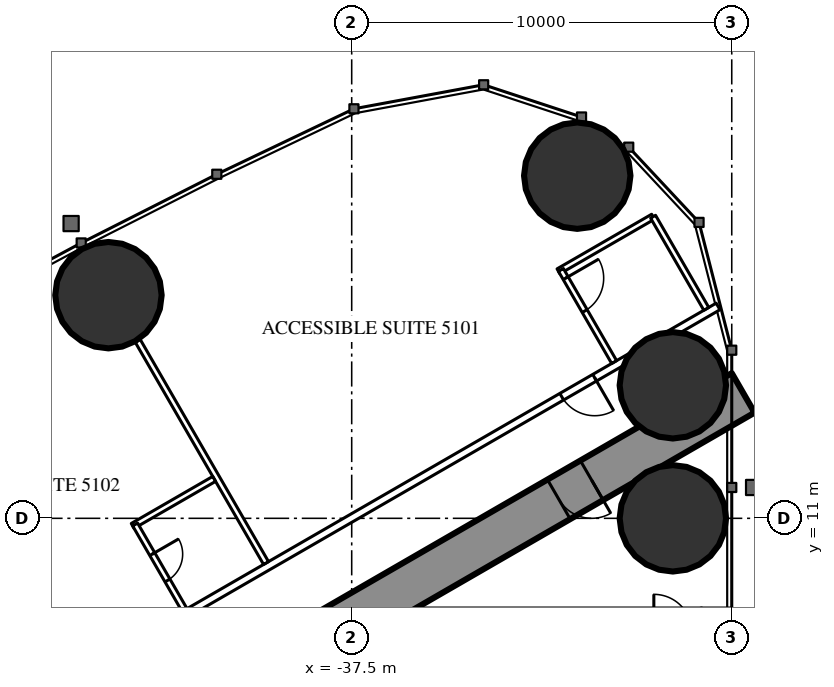
"""IFC4 building model, lengths in metres.
Left out: names, types, materials, properties, quantities, classifications, styles, units other than length and angle.
Written with IfcOpenShell. Run it as: python <this file> out.ifc"""

import sys

from ifc_helpers import new_model, si_unit, direction, frame, frame_2d, origin, origin_2d, place, context, subcontext, project, spatial, rectangle, circle, extrude, element, fill, save


model = new_model("IFC4")
c1 = context("Model", 3, precision=1e-05, world=origin(), true_north=direction((0.0, 1.0)))
c2 = subcontext(c1, "Body", "Model", "MODEL_VIEW")
j1 = project(units=[si_unit("LENGTHUNIT", "METRE"), si_unit("PLANEANGLEUNIT", "RADIAN")], contexts=[c1])
p1 = place(None, origin())
s1 = spatial("IfcSite", under=j1, at=p1, CompositionType="ELEMENT")
p2 = place(p1, origin())
s2 = spatial("IfcBuilding", under=s1, at=p2, CompositionType="ELEMENT")
p3 = place(p2, frame((0.0, 0.0, 191.3)))
s3 = spatial("IfcBuildingStorey", under=s2, at=p3, CompositionType="ELEMENT", Elevation=191.3)
for number, where, z_axis, x_axis in (
    (1, (-31.565, 20.016, 0.0), (0.0, 0.0, 1.0), (1.0, 0.0, 0.0)),
    (2, (-29.05, 11.0, 0.0), (0.0, 0.0, 1.0), (1.0, 0.0, 0.0)),
    (3, (-29.05, 14.5, 0.0), (0.0, 0.0, 1.0), (1.0, 0.0, 0.0)),
    (4, (-43.9, 16.871, 0.0), (0.0, 0.0, 1.0), (1.0, 0.0, 0.0)),
):
    element("IfcColumn", number, at=place(p3, frame(where, z_axis=z_axis, x_axis=x_axis)), inside=s3, PredefinedType="COLUMN", context=c2, shape_type="SweptSolid", body=[
        extrude(circle(Radius=1.4, at=origin_2d()), origin(), (0.0, 0.0, 1.0), 3.5),
    ])
p4 = place(p3, frame((-27.2, 14.3, 0.0), z_axis=(0.0, 0.0, 1.0), x_axis=(-0.866026593062, -0.499997940104, 0.0)))
e5 = element("IfcWall", 5, at=p4, inside=s3, PredefinedType="SHEAR", context=c2, shape_type="SweptSolid", body=[
    extrude(rectangle(XDim=28.946, YDim=1.2, at=frame_2d((14.473, 0.0))), origin(), (0.0, 0.0, 1.0), 3.5),
])
p5 = place(p4, frame((4.6, 0.0, 0.0)))
e6 = element("IfcOpeningElement", 6, at=p5, cuts=e5, PredefinedType="OPENING", context=c2, shape_type="SweptSolid", body=[
    extrude(rectangle(XDim=1.0, YDim=2.2, at=frame_2d((0.5, 1.1))), frame((0.0, 0.61, 0.0), z_axis=(0.0, -1.0, 0.0), x_axis=(1.0, 0.0, 0.0)), (0.0, 0.0, 1.0), 1.22),
])
p6 = place(p4, frame((13.395, 0.0, 0.0)))
e7 = element("IfcOpeningElement", 7, at=p6, cuts=e5, PredefinedType="OPENING", context=c2, shape_type="SweptSolid", body=[
    extrude(rectangle(XDim=1.8, YDim=2.2, at=frame_2d((0.9, 1.1))), frame((0.0, 0.61, 0.0), z_axis=(0.0, -1.0, 0.0), x_axis=(1.0, 0.0, 0.0)), (0.0, 0.0, 1.0), 1.22),
])
p7 = place(p3, frame((-27.86, 16.575, 0.0), z_axis=(0.0, 0.0, 1.0), x_axis=(-0.866025533911, -0.499999774615, 0.0)))
e8 = element("IfcWall", 8, at=p7, inside=s3, PredefinedType="PARTITIONING", context=c2, shape_type="SweptSolid", body=[
    extrude(rectangle(XDim=33.149, YDim=0.2, at=frame_2d((16.575, 0.0))), origin(), (0.0, 0.0, 1.0), 3.25),
])
p8 = place(p7, frame((3.75, 0.0, 0.0)))
e9 = element("IfcOpeningElement", 9, at=p8, cuts=e8, PredefinedType="OPENING", context=c2, shape_type="SweptSolid", body=[
    extrude(rectangle(XDim=1.0, YDim=2.2, at=frame_2d((0.5, 1.1))), frame((0.0, 0.11, 0.0), z_axis=(0.0, -1.0, 0.0), x_axis=(1.0, 0.0, 0.0)), (0.0, 0.0, 1.0), 0.22),
])
p9 = place(p7, frame((16.402, 0.0, 0.0)))
e10 = element("IfcOpeningElement", 10, at=p9, cuts=e8, PredefinedType="OPENING", context=c2, shape_type="SweptSolid", body=[
    extrude(rectangle(XDim=0.95, YDim=2.2, at=frame_2d((0.475, 1.1))), frame((0.0, 0.11, 0.0), z_axis=(0.0, -1.0, 0.0), x_axis=(1.0, 0.0, 0.0)), (0.0, 0.0, 1.0), 0.22),
])
p10 = place(p7, frame((22.047, 0.0, 0.0)))
e11 = element("IfcOpeningElement", 11, at=p10, cuts=e8, PredefinedType="OPENING", context=c2, shape_type="SweptSolid", body=[
    extrude(rectangle(XDim=0.95, YDim=2.2, at=frame_2d((0.475, 1.1))), frame((0.0, 0.11, 0.0), z_axis=(0.0, -1.0, 0.0), x_axis=(1.0, 0.0, 0.0)), (0.0, 0.0, 1.0), 0.22),
])
p11 = place(p7, frame((30.396, 0.0, 0.0)))
e12 = element("IfcOpeningElement", 12, at=p11, cuts=e8, PredefinedType="OPENING", context=c2, shape_type="SweptSolid", body=[
    extrude(rectangle(XDim=1.8, YDim=2.2, at=frame_2d((0.9, 1.1))), frame((0.0, 0.11, 0.0), z_axis=(0.0, -1.0, 0.0), x_axis=(1.0, 0.0, 0.0)), (0.0, 0.0, 1.0), 0.22),
])
p12 = place(p3, frame((-39.754, 9.823, 0.0), z_axis=(0.0, 0.0, 1.0), x_axis=(-0.499997670926, 0.866026748472, 0.0)))
e13 = element("IfcWall", 13, at=p12, inside=s3, PredefinedType="PARTITIONING", context=c2, shape_type="SweptSolid", body=[
    extrude(rectangle(XDim=6.757, YDim=0.15, at=frame_2d((3.379, 0.0))), origin(), (0.0, 0.0, 1.0), 2.3),
])
p13 = place(p3, frame((-29.57, 18.936, 0.0), z_axis=(0.0, 0.0, 1.0), x_axis=(-0.866018712932, -0.500011588718, 0.0)))
e14 = element("IfcWall", 14, at=p13, inside=s3, PredefinedType="PARTITIONING", context=c2, shape_type="SweptSolid", body=[
    extrude(rectangle(XDim=2.875, YDim=0.15, at=frame_2d((1.438, 0.0))), origin(), (0.0, 0.0, 1.0), 3.25),
])
p14 = place(p3, frame((-30.595, 15.111, 0.0), z_axis=(0.0, 0.0, 1.0), x_axis=(-0.49998411664, 0.866034573852, 0.0)))
e15 = element("IfcWall", 15, at=p14, inside=s3, PredefinedType="PARTITIONING", context=c2, shape_type="SweptSolid", body=[
    extrude(rectangle(XDim=2.8, YDim=0.15, at=frame_2d((1.4, 0.0))), origin(), (0.0, 0.0, 1.0), 3.25),
])
p15 = place(p14, frame((1.55, 0.0, 0.0)))
e16 = element("IfcOpeningElement", 16, at=p15, cuts=e15, PredefinedType="OPENING", context=c2, shape_type="SweptSolid", body=[
    extrude(rectangle(XDim=1.0, YDim=2.2, at=frame_2d((0.5, 1.1))), frame((0.0, 0.085, 0.0), z_axis=(0.0, -1.0, 0.0), x_axis=(1.0, 0.0, 0.0)), (0.0, 0.0, 1.0), 0.17),
])
p16 = place(p3, frame((-28.17, 16.511, 0.0), z_axis=(0.0, 0.0, 1.0), x_axis=(-0.49994636267, 0.866056369097, 0.0)))
e17 = element("IfcWall", 17, at=p16, inside=s3, PredefinedType="PARTITIONING", context=c2, shape_type="SweptSolid", body=[
    extrude(rectangle(XDim=2.8, YDim=0.15, at=frame_2d((1.4, 0.0))), origin(), (0.0, 0.0, 1.0), 3.25),
])
p17 = place(p3, frame((-41.119, 12.037, 0.0), z_axis=(0.0, 0.0, 1.0), x_axis=(-0.866073894602, -0.499916002032, 0.0)))
e18 = element("IfcWall", 18, at=p17, inside=s3, PredefinedType="PARTITIONING", context=c2, shape_type="SweptSolid", body=[
    extrude(rectangle(XDim=2.475, YDim=0.15, at=frame_2d((1.238, 0.0))), origin(), (0.0, 0.0, 1.0), 3.25),
])
p18 = place(p3, frame((-41.898, 8.585, 0.0), z_axis=(0.0, 0.0, 1.0), x_axis=(-0.500006934395, 0.866021400173, 0.0)))
e19 = element("IfcWall", 19, at=p18, inside=s3, PredefinedType="PARTITIONING", context=c2, shape_type="SweptSolid", body=[
    extrude(rectangle(XDim=2.6, YDim=0.15, at=frame_2d((1.3, 0.0))), origin(), (0.0, 0.0, 1.0), 3.25),
])
p19 = place(p18, frame((0.9, 0.0, 0.0)))
e20 = element("IfcOpeningElement", 20, at=p19, cuts=e19, PredefinedType="OPENING", context=c2, shape_type="SweptSolid", body=[
    extrude(rectangle(XDim=0.8, YDim=2.2, at=frame_2d((0.4, 1.1))), frame((0.0, 0.085, 0.0), z_axis=(0.0, -1.0, 0.0), x_axis=(1.0, 0.0, 0.0)), (0.0, 0.0, 1.0), 0.17),
])
p20 = place(p15, origin())
e21 = element("IfcDoor", 21, at=p20, inside=s3, OperationType="SINGLE_SWING_RIGHT", PredefinedType="DOOR", context=c2, shape_type="SweptSolid", body=[
    extrude(rectangle(XDim=1.0, YDim=2.2, at=frame_2d((0.5, 1.1))), frame((0.0, 0.025, 0.0), z_axis=(0.0, -1.0, 0.0), x_axis=(1.0, 0.0, 0.0)), (0.0, 0.0, 1.0), 0.05),
])
fill(e16, e21)
p21 = place(p8, origin())
e22 = element("IfcDoor", 22, at=p21, inside=s3, OperationType="SINGLE_SWING_LEFT", PredefinedType="DOOR", context=c2, shape_type="SweptSolid", body=[
    extrude(rectangle(XDim=1.0, YDim=2.2, at=frame_2d((0.5, 1.1))), frame((0.0, 0.025, 0.0), z_axis=(0.0, -1.0, 0.0), x_axis=(1.0, 0.0, 0.0)), (0.0, 0.0, 1.0), 0.05),
])
fill(e9, e22)
p22 = place(p19, origin())
e23 = element("IfcDoor", 23, at=p22, inside=s3, OperationType="SINGLE_SWING_RIGHT", PredefinedType="DOOR", context=c2, shape_type="SweptSolid", body=[
    extrude(rectangle(XDim=0.8, YDim=2.2, at=frame_2d((0.4, 1.1))), frame((0.0, 0.025, 0.0), z_axis=(0.0, -1.0, 0.0), x_axis=(1.0, 0.0, 0.0)), (0.0, 0.0, 1.0), 0.05),
])
fill(e20, e23)
p23 = place(p5, origin())
e24 = element("IfcDoor", 24, at=p23, inside=s3, OperationType="SINGLE_SWING_LEFT", PredefinedType="DOOR", context=c2, shape_type="SweptSolid", body=[
    extrude(rectangle(XDim=1.0, YDim=2.2, at=frame_2d((0.5, 1.1))), frame((0.0, 0.025, 0.0), z_axis=(0.0, -1.0, 0.0), x_axis=(1.0, 0.0, 0.0)), (0.0, 0.0, 1.0), 0.05),
])
fill(e6, e24)
save(model, sys.argv[1])
